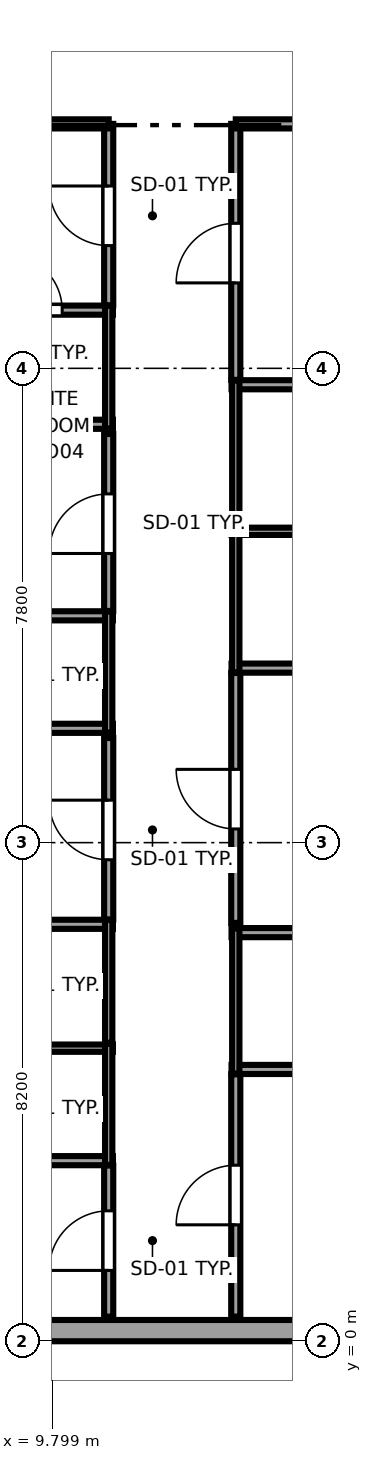
"""IFC4 building model, lengths in metres.
Left out: names, types, materials, properties, quantities, classifications, styles, units other than length and angle.
Written with IfcOpenShell. Run it as: python <this file> out.ifc"""

import sys

from ifc_helpers import new_model, si_unit, direction, frame, frame_2d, origin, place, context, subcontext, project, spatial, rectangle, extrude, source, transform, mapped, element, fill, save


model = new_model("IFC4")
c1 = context("Model", 3, precision=1e-05, world=origin(), true_north=direction((0.0, 1.0)))
c2 = subcontext(c1, "Body", "Model", "MODEL_VIEW")
j1 = project(units=[si_unit("LENGTHUNIT", "METRE"), si_unit("PLANEANGLEUNIT", "RADIAN")], contexts=[c1])
p1 = place(None, origin())
s1 = spatial("IfcSite", under=j1, at=p1, CompositionType="ELEMENT")
p2 = place(p1, origin())
s2 = spatial("IfcBuilding", under=s1, at=p2, CompositionType="ELEMENT")
p3 = place(p2, frame((0.0, 0.0, 129.3)))
s3 = spatial("IfcBuildingStorey", under=s2, at=p3, CompositionType="ELEMENT", Elevation=129.3)
p4 = place(p3, frame((4.617, 0.175, 0.0), z_axis=(0.0, 0.0, 1.0), x_axis=(1.0, 0.0, 0.0)))
e1 = element("IfcWall", 1, at=p4, inside=s3, PredefinedType="SOLIDWALL", context=c2, shape_type="SweptSolid", body=[
    extrude(rectangle(XDim=18.008, YDim=0.35, at=frame_2d((9.004, 0.0))), origin(), (0.0, 0.0, 1.0), 3.37),
])
p5 = place(p4, frame((14.257, 0.0, 0.68)))
e2 = element("IfcOpeningElement", 2, at=p5, cuts=e1, PredefinedType="OPENING", context=c2, shape_type="SweptSolid", body=[
    extrude(rectangle(XDim=2.1, YDim=1.9, at=frame_2d((1.05, 0.95))), frame((0.0, 0.185, 0.0), z_axis=(0.0, -1.0, 0.0), x_axis=(1.0, 0.0, 0.0)), (0.0, 0.0, 1.0), 0.37),
])
p6 = place(p4, frame((2.391, 0.0, 0.62)))
e3 = element("IfcOpeningElement", 3, at=p6, cuts=e1, PredefinedType="OPENING", context=c2, shape_type="SweptSolid", body=[
    extrude(rectangle(XDim=1.5, YDim=1.55, at=frame_2d((0.75, 0.775))), frame((0.0, 0.185, 0.0), z_axis=(0.0, -1.0, 0.0), x_axis=(1.0, 0.0, 0.0)), (0.0, 0.0, 1.0), 0.37),
])
p7 = place(p3, frame((8.21, 2.97, 0.0), z_axis=(0.0, 0.0, 1.0), x_axis=(1.0, 0.0, 0.0)))
e4 = element("IfcWall", 4, at=p7, inside=s3, PredefinedType="PARTITIONING", context=c2, shape_type="SweptSolid", body=[
    extrude(rectangle(XDim=2.59, YDim=0.15, at=frame_2d((1.295, 0.0))), origin(), (0.0, 0.0, 1.0), 3.37),
])
p8 = place(p3, frame((8.21, 4.82, 0.0), z_axis=(0.0, 0.0, 1.0), x_axis=(1.0, 0.0, 0.0)))
e5 = element("IfcWall", 5, at=p8, inside=s3, PredefinedType="PLUMBINGWALL", context=c2, shape_type="SweptSolid", body=[
    extrude(rectangle(XDim=2.59, YDim=0.12, at=frame_2d((1.295, 0.0))), origin(), (0.0, 0.0, 1.0), 3.37),
])
p9 = place(p3, frame((10.73, 2.9, 0.0), z_axis=(0.0, 0.0, 1.0), x_axis=(0.0, 1.0, 0.0)))
e6 = element("IfcWall", 6, at=p9, inside=s3, PredefinedType="PLUMBINGWALL", context=c2, shape_type="SweptSolid", body=[
    extrude(rectangle(XDim=1.99, YDim=0.12, at=frame_2d((0.995, 0.0))), origin(), (0.0, 0.0, 1.0), 3.37),
])
p10 = place(p3, frame((8.21, 6.857, 0.0), z_axis=(0.0, 0.0, 1.0), x_axis=(1.0, 0.0, 0.0)))
e7 = element("IfcWall", 7, at=p10, inside=s3, PredefinedType="PARTITIONING", context=c2, shape_type="SweptSolid", body=[
    extrude(rectangle(XDim=2.59, YDim=0.15, at=frame_2d((1.295, 0.0))), origin(), (0.0, 0.0, 1.0), 3.37),
])
p11 = place(p3, frame((10.73, 4.91, 0.0), z_axis=(0.0, 0.0, 1.0), x_axis=(0.0, 1.0, 0.0)))
e8 = element("IfcWall", 8, at=p11, inside=s3, PredefinedType="PLUMBINGWALL", context=c2, shape_type="SweptSolid", body=[
    extrude(rectangle(XDim=2.017, YDim=0.12, at=frame_2d((1.009, 0.0))), origin(), (0.0, 0.0, 1.0), 3.37),
])
p12 = place(p3, frame((0.405, 10.08, 0.0), z_axis=(0.0, 0.0, 1.0), x_axis=(1.0, 0.0, 0.0)))
e9 = element("IfcWall", 9, at=p12, inside=s3, PredefinedType="PARTITIONING", context=c2, shape_type="SweptSolid", body=[
    extrude(rectangle(XDim=10.395, YDim=0.15, at=frame_2d((5.198, 0.0))), origin(), (0.0, 0.0, 1.0), 3.37),
])
p13 = place(p3, frame((8.21, 11.93, 0.0), z_axis=(0.0, 0.0, 1.0), x_axis=(1.0, 0.0, 0.0)))
e10 = element("IfcWall", 10, at=p13, inside=s3, PredefinedType="PARTITIONING", context=c2, shape_type="SweptSolid", body=[
    extrude(rectangle(XDim=2.59, YDim=0.15, at=frame_2d((1.295, 0.0))), origin(), (0.0, 0.0, 1.0), 3.37),
])
p14 = place(p3, frame((10.73, 10.01, 0.0), z_axis=(0.0, 0.0, 1.0), x_axis=(0.0, 1.0, 0.0)))
e11 = element("IfcWall", 11, at=p14, inside=s3, PredefinedType="PLUMBINGWALL", context=c2, shape_type="SweptSolid", body=[
    extrude(rectangle(XDim=1.99, YDim=0.12, at=frame_2d((0.995, 0.0))), origin(), (0.0, 0.0, 1.0), 3.37),
])
p15 = place(p3, frame((0.405, 15.08, 0.0), z_axis=(0.0, 0.0, 1.0), x_axis=(1.0, 0.0, 0.0)))
e12 = element("IfcWall", 12, at=p15, inside=s3, PredefinedType="PARTITIONING", context=c2, shape_type="SweptSolid", body=[
    extrude(rectangle(XDim=10.395, YDim=0.15, at=frame_2d((5.198, 0.0))), origin(), (0.0, 0.0, 1.0), 3.37),
])
p16 = place(p3, frame((8.21, 16.957, 0.0), z_axis=(0.0, 0.0, 1.0), x_axis=(1.0, 0.0, 0.0)))
e13 = element("IfcWall", 13, at=p16, inside=s3, PredefinedType="PARTITIONING", context=c2, shape_type="SweptSolid", body=[
    extrude(rectangle(XDim=2.59, YDim=0.15, at=frame_2d((1.295, 0.0))), origin(), (0.0, 0.0, 1.0), 3.37),
])
p17 = place(p16, frame((0.835, 0.0, 0.0)))
e14 = element("IfcOpeningElement", 14, at=p17, cuts=e13, PredefinedType="OPENING", context=c2, shape_type="SweptSolid", body=[
    extrude(rectangle(XDim=0.92, YDim=2.01, at=frame_2d((0.46, 1.005))), frame((0.0, 0.085, 0.0), z_axis=(0.0, -1.0, 0.0), x_axis=(1.0, 0.0, 0.0)), (0.0, 0.0, 1.0), 0.17),
])
p18 = place(p3, frame((10.73, 15.01, 0.0), z_axis=(0.0, 0.0, 1.0), x_axis=(0.0, 1.0, 0.0)))
e15 = element("IfcWall", 15, at=p18, inside=s3, PredefinedType="PLUMBINGWALL", context=c2, shape_type="SweptSolid", body=[
    extrude(rectangle(XDim=2.017, YDim=0.12, at=frame_2d((1.009, 0.0))), origin(), (0.0, 0.0, 1.0), 3.37),
])
for number, where, z_axis, x_axis in (
    (16, (12.75, 4.47, 0.0), (0.0, 0.0, 1.0), (1.0, 0.0, 0.0)),
    (17, (12.75, 6.72, 0.0), (0.0, 0.0, 1.0), (1.0, 0.0, 0.0)),
):
    element("IfcWall", number, at=place(p3, frame(where, z_axis=z_axis, x_axis=x_axis)), inside=s3, PredefinedType="PARTITIONING", context=c2, shape_type="SweptSolid", body=[
        extrude(rectangle(XDim=2.59, YDim=0.15, at=frame_2d((1.295, 0.0))), origin(), (0.0, 0.0, 1.0), 3.37),
    ])
p19 = place(p3, frame((12.82, 4.4, 0.0), z_axis=(0.0, 0.0, 1.0), x_axis=(0.0, 1.0, 0.0)))
e18 = element("IfcWall", 18, at=p19, inside=s3, PredefinedType="PLUMBINGWALL", context=c2, shape_type="SweptSolid", body=[
    extrude(rectangle(XDim=2.39, YDim=0.12, at=frame_2d((1.195, 0.0))), origin(), (0.0, 0.0, 1.0), 3.37),
])
p20 = place(p3, frame((12.75, 11.07, 0.0), z_axis=(0.0, 0.0, 1.0), x_axis=(1.0, 0.0, 0.0)))
e19 = element("IfcWall", 19, at=p20, inside=s3, PredefinedType="PARTITIONING", context=c2, shape_type="SweptSolid", body=[
    extrude(rectangle(XDim=2.59, YDim=0.15, at=frame_2d((1.295, 0.0))), origin(), (0.0, 0.0, 1.0), 3.37),
])
p21 = place(p3, frame((12.75, 13.32, 0.0), z_axis=(0.0, 0.0, 1.0), x_axis=(1.0, 0.0, 0.0)))
e20 = element("IfcWall", 20, at=p21, inside=s3, PredefinedType="PLUMBINGWALL", context=c2, shape_type="SweptSolid", body=[
    extrude(rectangle(XDim=2.59, YDim=0.12, at=frame_2d((1.295, 0.0))), origin(), (0.0, 0.0, 1.0), 3.37),
])
p22 = place(p3, frame((12.82, 11.0, 0.0), z_axis=(0.0, 0.0, 1.0), x_axis=(0.0, 1.0, 0.0)))
e21 = element("IfcWall", 21, at=p22, inside=s3, PredefinedType="PLUMBINGWALL", context=c2, shape_type="SweptSolid", body=[
    extrude(rectangle(XDim=2.39, YDim=0.12, at=frame_2d((1.195, 0.0))), origin(), (0.0, 0.0, 1.0), 3.37),
])
p23 = place(p3, frame((12.75, 15.73, 0.0), z_axis=(0.0, 0.0, 1.0), x_axis=(1.0, 0.0, 0.0)))
e22 = element("IfcWall", 22, at=p23, inside=s3, PredefinedType="PARTITIONING", context=c2, shape_type="SweptSolid", body=[
    extrude(rectangle(XDim=2.59, YDim=0.15, at=frame_2d((1.295, 0.0))), origin(), (0.0, 0.0, 1.0), 3.37),
])
p24 = place(p3, frame((12.82, 13.41, 0.0), z_axis=(0.0, 0.0, 1.0), x_axis=(0.0, 1.0, 0.0)))
e23 = element("IfcWall", 23, at=p24, inside=s3, PredefinedType="PLUMBINGWALL", context=c2, shape_type="SweptSolid", body=[
    extrude(rectangle(XDim=2.39, YDim=0.12, at=frame_2d((1.195, 0.0))), origin(), (0.0, 0.0, 1.0), 3.37),
])
p25 = place(p3, frame((10.73, 0.405, 0.0), z_axis=(0.0, 0.0, 1.0), x_axis=(0.0, 1.0, 0.0)))
e24 = element("IfcWall", 24, at=p25, inside=s3, PredefinedType="PARTITIONING", context=c2, shape_type="SweptSolid", body=[
    extrude(rectangle(XDim=2.485, YDim=0.15, at=frame_2d((1.242, 0.0))), origin(), (0.0, 0.0, 1.0), 3.37),
])
p26 = place(p25, frame((0.76, 0.0, 0.0)))
e25 = element("IfcOpeningElement", 25, at=p26, cuts=e24, PredefinedType="OPENING", context=c2, shape_type="SweptSolid", body=[
    extrude(rectangle(XDim=0.98, YDim=2.12, at=frame_2d((0.49, 1.06))), frame((0.0, 0.085, 0.0), z_axis=(0.0, -1.0, 0.0), x_axis=(1.0, 0.0, 0.0)), (0.0, 0.0, 1.0), 0.17),
])
p27 = place(p3, frame((10.73, 6.937, 0.0), z_axis=(0.0, 0.0, 1.0), x_axis=(0.0, 1.0, 0.0)))
e26 = element("IfcWall", 26, at=p27, inside=s3, PredefinedType="PARTITIONING", context=c2, shape_type="SweptSolid", body=[
    extrude(rectangle(XDim=2.983, YDim=0.15, at=frame_2d((1.491, 0.0))), origin(), (0.0, 0.0, 1.0), 3.37),
])
p28 = place(p27, frame((0.981, 0.0, 0.0)))
e27 = element("IfcOpeningElement", 27, at=p28, cuts=e26, PredefinedType="OPENING", context=c2, shape_type="SweptSolid", body=[
    extrude(rectangle(XDim=0.98, YDim=2.12, at=frame_2d((0.49, 1.06))), frame((0.0, 0.085, 0.0), z_axis=(0.0, -1.0, 0.0), x_axis=(1.0, 0.0, 0.0)), (0.0, 0.0, 1.0), 0.17),
])
p29 = place(p3, frame((10.73, 12.01, 0.0), z_axis=(0.0, 0.0, 1.0), x_axis=(0.0, 1.0, 0.0)))
e28 = element("IfcWall", 28, at=p29, inside=s3, PredefinedType="PARTITIONING", context=c2, shape_type="SweptSolid", body=[
    extrude(rectangle(XDim=2.91, YDim=0.15, at=frame_2d((1.455, 0.0))), origin(), (0.0, 0.0, 1.0), 3.37),
])
p30 = place(p29, frame((0.945, 0.0, 0.0)))
e29 = element("IfcOpeningElement", 29, at=p30, cuts=e28, PredefinedType="OPENING", context=c2, shape_type="SweptSolid", body=[
    extrude(rectangle(XDim=0.98, YDim=2.12, at=frame_2d((0.49, 1.06))), frame((0.0, 0.085, 0.0), z_axis=(0.0, -1.0, 0.0), x_axis=(1.0, 0.0, 0.0)), (0.0, 0.0, 1.0), 0.17),
])
p31 = place(p3, frame((10.73, 17.037, 0.0), z_axis=(0.0, 0.0, 1.0), x_axis=(0.0, 1.0, 0.0)))
e30 = element("IfcWall", 30, at=p31, inside=s3, PredefinedType="PARTITIONING", context=c2, shape_type="SweptSolid", body=[
    extrude(rectangle(XDim=2.983, YDim=0.15, at=frame_2d((1.491, 0.0))), origin(), (0.0, 0.0, 1.0), 3.37),
])
p32 = place(p31, frame((0.981, 0.0, 0.0)))
e31 = element("IfcOpeningElement", 31, at=p32, cuts=e30, PredefinedType="OPENING", context=c2, shape_type="SweptSolid", body=[
    extrude(rectangle(XDim=0.98, YDim=2.12, at=frame_2d((0.49, 1.06))), frame((0.0, 0.085, 0.0), z_axis=(0.0, -1.0, 0.0), x_axis=(1.0, 0.0, 0.0)), (0.0, 0.0, 1.0), 0.17),
])
p33 = place(p3, frame((0.405, 20.02, 0.0), z_axis=(0.0, 0.0, 1.0), x_axis=(1.0, 0.0, 0.0)))
e32 = element("IfcWall", 32, at=p33, inside=s3, PredefinedType="PARTITIONING", context=c2, shape_type="SweptSolid", body=[
    extrude(rectangle(XDim=10.325, YDim=0.15, at=frame_2d((5.163, 0.0))), origin(), (0.0, 0.0, 1.0), 3.37),
])
p34 = place(p3, frame((12.82, 0.405, 0.0), z_axis=(0.0, 0.0, 1.0), x_axis=(0.0, 1.0, 0.0)))
e33 = element("IfcWall", 33, at=p34, inside=s3, PredefinedType="PARTITIONING", context=c2, shape_type="SweptSolid", body=[
    extrude(rectangle(XDim=3.985, YDim=0.15, at=frame_2d((1.992, 0.0))), origin(), (0.0, 0.0, 1.0), 3.37),
])
p35 = place(p34, frame((1.51, 0.0, 0.0)))
e34 = element("IfcOpeningElement", 34, at=p35, cuts=e33, PredefinedType="OPENING", context=c2, shape_type="SweptSolid", body=[
    extrude(rectangle(XDim=0.98, YDim=2.12, at=frame_2d((0.49, 1.06))), frame((0.0, 0.085, 0.0), z_axis=(0.0, -1.0, 0.0), x_axis=(1.0, 0.0, 0.0)), (0.0, 0.0, 1.0), 0.17),
])
p36 = place(p3, frame((12.82, 6.88, 0.0), z_axis=(0.0, 0.0, 1.0), x_axis=(0.0, 1.0, 0.0)))
e35 = element("IfcWall", 35, at=p36, inside=s3, PredefinedType="PARTITIONING", context=c2, shape_type="SweptSolid", body=[
    extrude(rectangle(XDim=4.11, YDim=0.15, at=frame_2d((2.055, 0.0))), origin(), (0.0, 0.0, 1.0), 3.37),
])
p37 = place(p36, frame((1.545, 0.0, 0.0)))
e36 = element("IfcOpeningElement", 36, at=p37, cuts=e35, PredefinedType="OPENING", context=c2, shape_type="SweptSolid", body=[
    extrude(rectangle(XDim=0.98, YDim=2.12, at=frame_2d((0.49, 1.06))), frame((0.0, 0.085, 0.0), z_axis=(0.0, -1.0, 0.0), x_axis=(1.0, 0.0, 0.0)), (0.0, 0.0, 1.0), 0.17),
])
p38 = place(p3, frame((12.82, 15.81, 0.0), z_axis=(0.0, 0.0, 1.0), x_axis=(0.0, 1.0, 0.0)))
e37 = element("IfcWall", 37, at=p38, inside=s3, PredefinedType="PARTITIONING", context=c2, shape_type="SweptSolid", body=[
    extrude(rectangle(XDim=4.21, YDim=0.15, at=frame_2d((2.105, 0.0))), origin(), (0.0, 0.0, 1.0), 3.37),
])
p39 = place(p38, frame((1.595, 0.0, 0.0)))
e38 = element("IfcOpeningElement", 38, at=p39, cuts=e37, PredefinedType="OPENING", context=c2, shape_type="SweptSolid", body=[
    extrude(rectangle(XDim=0.98, YDim=2.12, at=frame_2d((0.49, 1.06))), frame((0.0, 0.085, 0.0), z_axis=(0.0, -1.0, 0.0), x_axis=(1.0, 0.0, 0.0)), (0.0, 0.0, 1.0), 0.17),
])
p40 = place(p3, frame((12.82, 20.02, 0.0), z_axis=(0.0, 0.0, 1.0), x_axis=(1.0, 0.0, 0.0)))
e39 = element("IfcWall", 39, at=p40, inside=s3, PredefinedType="PARTITIONING", context=c2, shape_type="SweptSolid", body=[
    extrude(rectangle(XDim=9.53, YDim=0.15, at=frame_2d((4.765, 0.0))), origin(), (0.0, 0.0, 1.0), 2.954),
])
m1 = source(origin(), c2, "Body", "SweptSolid", [
    extrude(rectangle(XDim=0.92, YDim=2.01, at=frame_2d((0.46, 1.005))), frame((0.0, 0.025, 0.0), z_axis=(0.0, -1.0, 0.0), x_axis=(1.0, 0.0, 0.0)), (0.0, 0.0, 1.0), 0.05),
])
p41 = place(p17, origin())
e40 = element("IfcDoor", 40, at=p41, inside=s3, OperationType="SINGLE_SWING_LEFT", PredefinedType="DOOR", context=c2, shape_type="MappedRepresentation", body=[
    mapped(m1, transform((0.0, 0.0, 0.0), x_axis=(1.0, 0.0, 0.0), y_axis=(0.0, 1.0, 0.0), z_axis=(0.0, 0.0, 1.0), scale=1.0)),
])
fill(e14, e40)
m2 = source(origin(), c2, "Body", "SweptSolid", [
    extrude(rectangle(XDim=0.98, YDim=2.12, at=frame_2d((0.49, 1.06))), frame((0.0, 0.025, 0.0), z_axis=(0.0, -1.0, 0.0), x_axis=(1.0, 0.0, 0.0)), (0.0, 0.0, 1.0), 0.05),
])
p42 = place(p26, origin())
e41 = element("IfcDoor", 41, at=p42, inside=s3, OperationType="SINGLE_SWING_LEFT", PredefinedType="DOOR", context=c2, shape_type="MappedRepresentation", body=[
    mapped(m2, transform((0.0, 0.0, 0.0), x_axis=(1.0, 0.0, 0.0), y_axis=(0.0, 1.0, 0.0), z_axis=(0.0, 0.0, 1.0), scale=1.0)),
])
fill(e25, e41)
p43 = place(p28, origin())
e42 = element("IfcDoor", 42, at=p43, inside=s3, OperationType="SINGLE_SWING_RIGHT", PredefinedType="DOOR", context=c2, shape_type="MappedRepresentation", body=[
    mapped(m2, transform((0.0, 0.0, 0.0), x_axis=(1.0, 0.0, 0.0), y_axis=(0.0, 1.0, 0.0), z_axis=(0.0, 0.0, 1.0), scale=1.0)),
])
fill(e27, e42)
p44 = place(p30, origin())
e43 = element("IfcDoor", 43, at=p44, inside=s3, OperationType="SINGLE_SWING_LEFT", PredefinedType="DOOR", context=c2, shape_type="MappedRepresentation", body=[
    mapped(m2, transform((0.0, 0.0, 0.0), x_axis=(1.0, 0.0, 0.0), y_axis=(0.0, 1.0, 0.0), z_axis=(0.0, 0.0, 1.0), scale=1.0)),
])
fill(e29, e43)
p45 = place(p32, origin())
e44 = element("IfcDoor", 44, at=p45, inside=s3, OperationType="SINGLE_SWING_RIGHT", PredefinedType="DOOR", context=c2, shape_type="MappedRepresentation", body=[
    mapped(m2, transform((0.0, 0.0, 0.0), x_axis=(1.0, 0.0, 0.0), y_axis=(0.0, 1.0, 0.0), z_axis=(0.0, 0.0, 1.0), scale=1.0)),
])
fill(e31, e44)
p46 = place(p35, origin())
e45 = element("IfcDoor", 45, at=p46, inside=s3, OperationType="SINGLE_SWING_LEFT", PredefinedType="DOOR", context=c2, shape_type="MappedRepresentation", body=[
    mapped(m2, transform((0.0, 0.0, 0.0), x_axis=(1.0, 0.0, 0.0), y_axis=(0.0, 1.0, 0.0), z_axis=(0.0, 0.0, 1.0), scale=1.0)),
])
fill(e34, e45)
p47 = place(p37, origin())
e46 = element("IfcDoor", 46, at=p47, inside=s3, OperationType="SINGLE_SWING_RIGHT", PredefinedType="DOOR", context=c2, shape_type="MappedRepresentation", body=[
    mapped(m2, transform((0.0, 0.0, 0.0), x_axis=(1.0, 0.0, 0.0), y_axis=(0.0, 1.0, 0.0), z_axis=(0.0, 0.0, 1.0), scale=1.0)),
])
fill(e36, e46)
p48 = place(p39, origin())
e47 = element("IfcDoor", 47, at=p48, inside=s3, OperationType="SINGLE_SWING_LEFT", PredefinedType="DOOR", context=c2, shape_type="MappedRepresentation", body=[
    mapped(m2, transform((0.0, 0.0, 0.0), x_axis=(1.0, 0.0, 0.0), y_axis=(0.0, 1.0, 0.0), z_axis=(0.0, 0.0, 1.0), scale=1.0)),
])
fill(e38, e47)
save(model, sys.argv[1])
